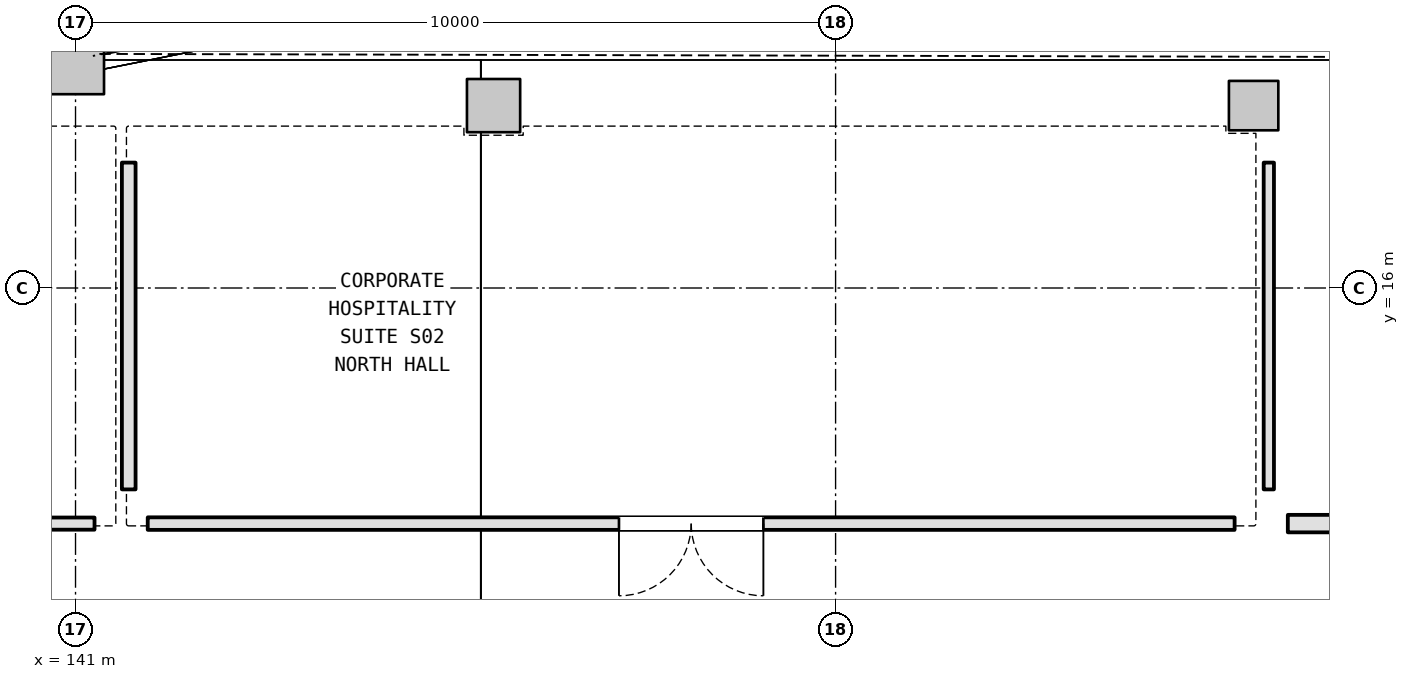
"""IFC4 building model, lengths in metres.
Left out: names, types, materials, properties, quantities, classifications, styles, units other than length and angle.
Written with IfcOpenShell. Run it as: python <this file> out.ifc"""

import sys

from ifc_helpers import new_model, si_unit, direction, frame, frame_2d, origin, origin_2d, place, context, subcontext, project, spatial, rectangle, extrude, element, fill, save


model = new_model("IFC4")
c1 = context("Model", 3, precision=1e-05, world=origin(), true_north=direction((0.0, 1.0)))
c2 = subcontext(c1, "Body", "Model", "MODEL_VIEW")
j1 = project(units=[si_unit("LENGTHUNIT", "METRE"), si_unit("PLANEANGLEUNIT", "RADIAN")], contexts=[c1])
p1 = place(None, origin())
s1 = spatial("IfcSite", under=j1, at=p1, CompositionType="ELEMENT")
p2 = place(p1, origin())
s2 = spatial("IfcBuilding", under=s1, at=p2, CompositionType="ELEMENT")
p3 = place(p2, frame((0.0, 0.0, 10.8)))
s3 = spatial("IfcBuildingStorey", under=s2, at=p3, CompositionType="ELEMENT", Elevation=10.8)
p4 = place(p3, frame((141.0, 19.0, 0.0), z_axis=(0.0, 0.0, 1.0), x_axis=(1.0, 0.0, 0.0)))
e1 = element("IfcColumn", 1, at=p4, inside=s3, PredefinedType="COLUMN", context=c2, shape_type="SweptSolid", body=[
    extrude(rectangle(XDim=0.75, YDim=0.9, at=origin_2d()), origin(), (0.0, 0.0, 1.0), 5.4),
])
p5 = place(p3, frame((146.5, 18.4, 0.0), z_axis=(0.0, 0.0, 1.0), x_axis=(1.0, 0.0, 0.0)))
e2 = element("IfcColumn", 2, at=p5, inside=s3, PredefinedType="COLUMN", context=c2, shape_type="SweptSolid", body=[
    extrude(rectangle(XDim=0.7, YDim=0.7, at=origin_2d()), origin(), (0.0, 0.0, 1.0), 5.4),
])
p6 = place(p3, frame((156.5, 18.4, 0.0), z_axis=(0.0, 0.0, 1.0), x_axis=(1.0, 0.0, 0.0)))
e3 = element("IfcColumn", 3, at=p6, inside=s3, PredefinedType="COLUMN", context=c2, shape_type="SweptSolid", body=[
    extrude(rectangle(XDim=0.65, YDim=0.65, at=origin_2d()), origin(), (0.0, 0.0, 1.0), 5.4),
])
p7 = place(p3, frame((141.25, 12.9, 0.0), z_axis=(0.0, 0.0, 1.0), x_axis=(-1.0, 0.0, 0.0)))
e4 = element("IfcWall", 4, at=p7, inside=s3, PredefinedType="PARTITIONING", context=c2, shape_type="SweptSolid", body=[
    extrude(rectangle(XDim=14.3, YDim=0.16, at=frame_2d((7.15, 0.0))), origin(), (0.0, 0.0, 1.0), 4.435),
])
p8 = place(p7, frame((6.65, 0.0, 0.0)))
e5 = element("IfcOpeningElement", 5, at=p8, cuts=e4, PredefinedType="OPENING", context=c2, shape_type="SweptSolid", body=[
    extrude(rectangle(XDim=1.0, YDim=2.1, at=frame_2d((0.5, 1.05))), frame((0.0, 0.09, 0.0), z_axis=(0.0, -1.0, 0.0), x_axis=(1.0, 0.0, 0.0)), (0.0, 0.0, 1.0), 0.18),
])
p9 = place(p3, frame((156.25, 12.9, 0.0), z_axis=(0.0, 0.0, 1.0), x_axis=(-1.0, 0.0, 0.0)))
e6 = element("IfcWall", 6, at=p9, inside=s3, PredefinedType="PARTITIONING", context=c2, shape_type="SweptSolid", body=[
    extrude(rectangle(XDim=14.3, YDim=0.165, at=frame_2d((7.15, 0.0))), origin(), (0.0, 0.0, 1.0), 4.435),
])
p10 = place(p9, frame((6.2, 0.0, 0.0)))
e7 = element("IfcOpeningElement", 7, at=p10, cuts=e6, PredefinedType="OPENING", context=c2, shape_type="SweptSolid", body=[
    extrude(rectangle(XDim=1.9, YDim=2.3, at=frame_2d((0.95, 1.15))), frame((0.0, 0.093, 0.0), z_axis=(0.0, -1.0, 0.0), x_axis=(1.0, 0.0, 0.0)), (0.0, 0.0, 1.0), 0.185),
])
p11 = place(p3, frame((141.7, 13.35, 0.0), z_axis=(0.0, 0.0, 1.0), x_axis=(0.0, 1.0, 0.0)))
e8 = element("IfcWall", 8, at=p11, inside=s3, PredefinedType="PARTITIONING", context=c2, shape_type="SweptSolid", body=[
    extrude(rectangle(XDim=4.3, YDim=0.18, at=frame_2d((2.15, 0.0))), origin(), (0.0, 0.0, 1.0), 4.635),
])
p12 = place(p3, frame((170.25, 12.9, 0.0), z_axis=(0.0, 0.0, 1.0), x_axis=(-1.0, 0.0, 0.0)))
e9 = element("IfcWall", 9, at=p12, inside=s3, PredefinedType="PLUMBINGWALL", context=c2, shape_type="SweptSolid", body=[
    extrude(rectangle(XDim=13.3, YDim=0.23, at=frame_2d((6.65, 0.0))), origin(), (0.0, 0.0, 1.0), 4.435),
])
p13 = place(p12, frame((6.14, 0.0, 0.0)))
e10 = element("IfcOpeningElement", 10, at=p13, cuts=e9, PredefinedType="OPENING", context=c2, shape_type="SweptSolid", body=[
    extrude(rectangle(XDim=1.02, YDim=2.15, at=frame_2d((0.51, 1.075))), frame((0.0, 0.125, 0.0), z_axis=(0.0, -1.0, 0.0), x_axis=(1.0, 0.0, 0.0)), (0.0, 0.0, 1.0), 0.25),
])
p14 = place(p3, frame((156.7, 13.35, 0.0), z_axis=(0.0, 0.0, 1.0), x_axis=(0.0, 1.0, 0.0)))
e11 = element("IfcWall", 11, at=p14, inside=s3, PredefinedType="PARTITIONING", context=c2, shape_type="SweptSolid", body=[
    extrude(rectangle(XDim=4.3, YDim=0.135, at=frame_2d((2.15, 0.0))), origin(), (0.0, 0.0, 1.0), 4.435),
])
p15 = place(p10, origin())
e12 = element("IfcDoor", 12, at=p15, inside=s3, OperationType="DOUBLE_DOOR_SINGLE_SWING", PredefinedType="DOOR", context=c2, shape_type="SweptSolid", body=[
    extrude(rectangle(XDim=1.9, YDim=2.3, at=frame_2d((0.95, 1.15))), frame((0.0, 0.025, 0.0), z_axis=(0.0, -1.0, 0.0), x_axis=(1.0, 0.0, 0.0)), (0.0, 0.0, 1.0), 0.05),
])
fill(e7, e12)
save(model, sys.argv[1])
